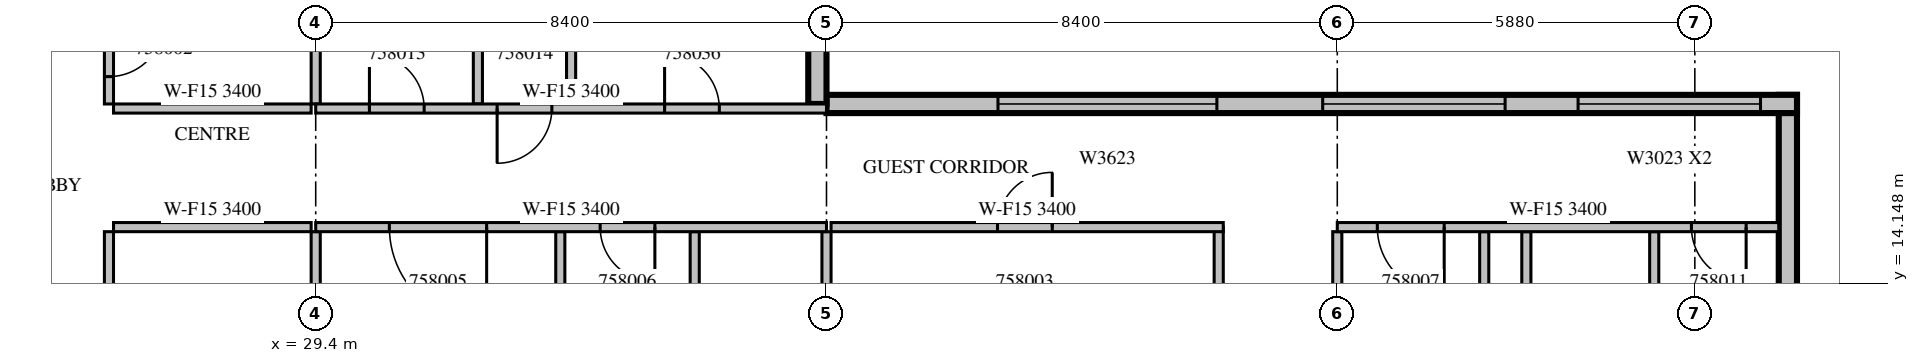
"""IFC4 building model, lengths in metres.
Left out: names, types, materials, properties, quantities, classifications, styles, units other than length and angle.
Written with IfcOpenShell. Run it as: python <this file> out.ifc"""

import sys

from ifc_helpers import new_model, si_unit, direction, frame, frame_2d, origin, place, context, subcontext, project, spatial, rectangle, extrude, source, transform, mapped, element, fill, save


model = new_model("IFC4")
c1 = context("Model", 3, precision=1e-05, world=origin(), true_north=direction((0.0, 1.0)))
c2 = subcontext(c1, "Body", "Model", "MODEL_VIEW")
j1 = project(units=[si_unit("LENGTHUNIT", "METRE"), si_unit("PLANEANGLEUNIT", "RADIAN")], contexts=[c1])
p1 = place(None, origin())
s1 = spatial("IfcSite", under=j1, at=p1, CompositionType="ELEMENT")
p2 = place(p1, origin())
s2 = spatial("IfcBuilding", under=s1, at=p2, CompositionType="ELEMENT")
p3 = place(p2, frame((0.0, 0.0, 253.8)))
s3 = spatial("IfcBuildingStorey", under=s2, at=p3, CompositionType="ELEMENT", Elevation=253.8)
m1 = source(origin(), c2, "Body", "SweptSolid", [
    extrude(rectangle(XDim=6.75, YDim=0.3, at=frame_2d((3.375, 0.0))), origin(), (0.0, 0.0, 1.0), 3.4),
])
p4 = place(p3, frame((53.61, 10.5, 0.0), z_axis=(0.0, 0.0, 1.0), x_axis=(0.0, 1.0, 0.0)))
e1 = element("IfcWall", 1, at=p4, inside=s3, PredefinedType="STANDARD", context=c2, shape_type="MappedRepresentation", body=[
    mapped(m1, transform((0.0, 0.0, 0.0), scale=1.0)),
])
m2 = source(origin(), c2, "Body", "SweptSolid", [
    extrude(rectangle(XDim=1.8, YDim=2.3, at=frame_2d((0.9, 1.15))), frame((0.0, 0.16, 0.0), z_axis=(0.0, -1.0, 0.0), x_axis=(1.0, 0.0, 0.0)), (0.0, 0.0, 1.0), 0.32),
])
p5 = place(p4, frame((0.787, 0.0, 0.6)))
e2 = element("IfcOpeningElement", 2, at=p5, cuts=e1, PredefinedType="OPENING", context=c2, shape_type="MappedRepresentation", body=[
    mapped(m2, transform((0.0, 0.0, 0.0), scale=1.0)),
])
m3 = source(origin(), c2, "Body", "SweptSolid", [
    extrude(rectangle(XDim=15.96, YDim=0.3, at=frame_2d((7.98, 0.0))), origin(), (0.0, 0.0, 1.0), 3.4),
])
p6 = place(p3, frame((53.76, 17.1, 0.0), z_axis=(0.0, 0.0, 1.0), x_axis=(-1.0, 0.0, 0.0)))
e3 = element("IfcWall", 3, at=p6, inside=s3, PredefinedType="STANDARD", context=c2, shape_type="MappedRepresentation", body=[
    mapped(m3, transform((0.0, 0.0, 0.0), scale=1.0)),
])
m4 = source(origin(), c2, "Body", "SweptSolid", [
    extrude(rectangle(XDim=3.0, YDim=2.3, at=frame_2d((1.5, 1.15))), frame((0.0, 0.16, 0.0), z_axis=(0.0, -1.0, 0.0), x_axis=(1.0, 0.0, 0.0)), (0.0, 0.0, 1.0), 0.32),
])
p7 = place(p6, frame((0.6, 0.0, 0.6)))
e4 = element("IfcOpeningElement", 4, at=p7, cuts=e3, PredefinedType="OPENING", context=c2, shape_type="MappedRepresentation", body=[
    mapped(m4, transform((0.0, 0.0, 0.0), scale=1.0)),
])
p8 = place(p6, frame((4.8, 0.0, 0.6)))
e5 = element("IfcOpeningElement", 5, at=p8, cuts=e3, PredefinedType="OPENING", context=c2, shape_type="MappedRepresentation", body=[
    mapped(m4, transform((0.0, 0.0, 0.0), scale=1.0)),
])
m5 = source(origin(), c2, "Body", "SweptSolid", [
    extrude(rectangle(XDim=3.6, YDim=2.3, at=frame_2d((1.8, 1.15))), frame((0.0, 0.16, 0.0), z_axis=(0.0, -1.0, 0.0), x_axis=(1.0, 0.0, 0.0)), (0.0, 0.0, 1.0), 0.32),
])
p9 = place(p6, frame((9.54, 0.0, 0.6)))
e6 = element("IfcOpeningElement", 6, at=p9, cuts=e3, PredefinedType="OPENING", context=c2, shape_type="MappedRepresentation", body=[
    mapped(m5, transform((0.0, 0.0, 0.0), scale=1.0)),
])
m6 = source(origin(), c2, "Body", "SweptSolid", [
    extrude(rectangle(XDim=3.1, YDim=0.3, at=frame_2d((1.55, 0.0))), origin(), (0.0, 0.0, 1.0), 3.4),
])
p10 = place(p3, frame((37.65, 17.1, 0.0), z_axis=(0.0, 0.0, 1.0), x_axis=(0.0, 1.0, 0.0)))
e7 = element("IfcWall", 7, at=p10, inside=s3, PredefinedType="STANDARD", context=c2, shape_type="MappedRepresentation", body=[
    mapped(m6, transform((0.0, 0.0, 0.0), scale=1.0)),
])
p11 = place(p10, frame((1.125, 0.0, 0.6)))
e8 = element("IfcOpeningElement", 8, at=p11, cuts=e7, PredefinedType="OPENING", context=c2, shape_type="MappedRepresentation", body=[
    mapped(m2, transform((0.0, 0.0, 0.0), scale=1.0)),
])
m7 = source(origin(), c2, "Body", "SweptSolid", [
    extrude(rectangle(XDim=4.295, YDim=0.15, at=frame_2d((2.147, 0.0))), origin(), (0.0, 0.0, 1.0), 3.4),
])
p12 = place(p3, frame((26.0, 15.0, 0.0), z_axis=(0.0, 0.0, 1.0), x_axis=(0.0, -1.0, 0.0)))
e9 = element("IfcWall", 9, at=p12, inside=s3, PredefinedType="PARTITIONING", context=c2, shape_type="MappedRepresentation", body=[
    mapped(m7, transform((0.0, 0.0, 0.0), scale=1.0)),
])
m8 = source(origin(), c2, "Body", "SweptSolid", [
    extrude(rectangle(XDim=0.9, YDim=2.1, at=frame_2d((0.45, 1.05))), frame((0.0, 0.085, 0.0), z_axis=(0.0, -1.0, 0.0), x_axis=(1.0, 0.0, 0.0)), (0.0, 0.0, 1.0), 0.17),
])
p13 = place(p12, frame((1.113, 0.0, 0.0)))
e10 = element("IfcOpeningElement", 10, at=p13, cuts=e9, PredefinedType="OPENING", context=c2, shape_type="MappedRepresentation", body=[
    mapped(m8, transform((0.0, 0.0, 0.0), scale=1.0)),
])
m9 = source(origin(), c2, "Body", "SweptSolid", [
    extrude(rectangle(XDim=3.6, YDim=0.15, at=frame_2d((1.8, 0.0))), origin(), (0.0, 0.0, 1.0), 3.4),
])
p14 = place(p3, frame((26.0, 20.7, 0.0), z_axis=(0.0, 0.0, 1.0), x_axis=(0.0, -1.0, 0.0)))
e11 = element("IfcWall", 11, at=p14, inside=s3, PredefinedType="PARTITIONING", context=c2, shape_type="MappedRepresentation", body=[
    mapped(m9, transform((0.0, 0.0, 0.0), scale=1.0)),
])
p15 = place(p14, frame((2.25, 0.0, 0.0)))
e12 = element("IfcOpeningElement", 12, at=p15, cuts=e11, PredefinedType="OPENING", context=c2, shape_type="MappedRepresentation", body=[
    mapped(m8, transform((0.0, 0.0, 0.0), scale=1.0)),
])
m10 = source(origin(), c2, "Body", "SweptSolid", [
    extrude(rectangle(XDim=3.25, YDim=0.15, at=frame_2d((1.625, 0.0))), origin(), (0.0, 0.0, 1.0), 3.4),
])
for number, where, z_axis, x_axis in (
    (13, (29.325, 15.075, 0.0), (0.0, 0.0, 1.0), (-1.0, 0.0, 0.0)),
    (14, (26.075, 17.025, 0.0), (0.0, 0.0, 1.0), (1.0, 0.0, 0.0)),
):
    element("IfcWall", number, at=place(p3, frame(where, z_axis=z_axis, x_axis=x_axis)), inside=s3, PredefinedType="PARTITIONING", context=c2, shape_type="MappedRepresentation", body=[
        mapped(m10, transform((0.0, 0.0, 0.0), scale=1.0)),
    ])
m11 = source(origin(), c2, "Body", "SweptSolid", [
    extrude(rectangle(XDim=4.101, YDim=0.15, at=frame_2d((2.05, 0.0))), origin(), (0.0, 0.0, 1.0), 3.4),
])
p16 = place(p3, frame((29.4, 10.899, 0.0), z_axis=(0.0, 0.0, 1.0), x_axis=(0.0, 1.0, 0.0)))
e15 = element("IfcWall", 15, at=p16, inside=s3, PredefinedType="PARTITIONING", context=c2, shape_type="MappedRepresentation", body=[
    mapped(m11, transform((0.0, 0.0, 0.0), scale=1.0)),
])
m12 = source(origin(), c2, "Body", "SweptSolid", [
    extrude(rectangle(XDim=3.101, YDim=0.15, at=frame_2d((1.55, 0.0))), origin(), (0.0, 0.0, 1.0), 3.4),
])
p17 = place(p3, frame((29.4, 17.1, 0.0), z_axis=(0.0, 0.0, 1.0), x_axis=(0.0, 1.0, 0.0)))
e16 = element("IfcWall", 16, at=p17, inside=s3, PredefinedType="PARTITIONING", context=c2, shape_type="MappedRepresentation", body=[
    mapped(m12, transform((0.0, 0.0, 0.0), scale=1.0)),
])
m13 = source(origin(), c2, "Body", "SweptSolid", [
    extrude(rectangle(XDim=3.175, YDim=0.15, at=frame_2d((1.587, 0.0))), origin(), (0.0, 0.0, 1.0), 3.4),
])
p18 = place(p3, frame((44.25, 11.9, 0.0), z_axis=(0.0, 0.0, 1.0), x_axis=(0.0, 1.0, 0.0)))
e17 = element("IfcWall", 17, at=p18, inside=s3, PredefinedType="PARTITIONING", context=c2, shape_type="MappedRepresentation", body=[
    mapped(m13, transform((0.0, 0.0, 0.0), scale=1.0)),
])
m14 = source(origin(), c2, "Body", "SweptSolid", [
    extrude(rectangle(XDim=6.45, YDim=0.15, at=frame_2d((3.225, 0.0))), origin(), (0.0, 0.0, 1.0), 3.4),
])
p19 = place(p3, frame((44.325, 15.075, 0.0), z_axis=(0.0, 0.0, 1.0), x_axis=(-1.0, 0.0, 0.0)))
e18 = element("IfcWall", 18, at=p19, inside=s3, PredefinedType="PARTITIONING", context=c2, shape_type="MappedRepresentation", body=[
    mapped(m14, transform((0.0, 0.0, 0.0), scale=1.0)),
])
p20 = place(p19, frame((2.812, 0.0, 0.0)))
e19 = element("IfcOpeningElement", 19, at=p20, cuts=e18, PredefinedType="OPENING", context=c2, shape_type="MappedRepresentation", body=[
    mapped(m8, transform((0.0, 0.0, 0.0), scale=1.0)),
])
p21 = place(p3, frame((33.422, 10.705, 0.0), z_axis=(0.0, 0.0, 1.0), x_axis=(0.0, 1.0, 0.0)))
e20 = element("IfcWall", 20, at=p21, inside=s3, PredefinedType="PARTITIONING", context=c2, shape_type="MappedRepresentation", body=[
    mapped(m7, transform((0.0, 0.0, 0.0), scale=1.0)),
])
p22 = place(p3, frame((35.633, 10.705, 0.0), z_axis=(0.0, 0.0, 1.0), x_axis=(0.0, 1.0, 0.0)))
e21 = element("IfcWall", 21, at=p22, inside=s3, PredefinedType="PARTITIONING", context=c2, shape_type="MappedRepresentation", body=[
    mapped(m7, transform((0.0, 0.0, 0.0), scale=1.0)),
])
p23 = place(p22, frame((1.698, 0.0, 0.0)))
e22 = element("IfcOpeningElement", 22, at=p23, cuts=e21, PredefinedType="OPENING", context=c2, shape_type="MappedRepresentation", body=[
    mapped(m8, transform((0.0, 0.0, 0.0), scale=1.0)),
])
p24 = place(p3, frame((37.8, 10.899, 0.0), z_axis=(0.0, 0.0, 1.0), x_axis=(0.0, 1.0, 0.0)))
e23 = element("IfcWall", 23, at=p24, inside=s3, PredefinedType="PARTITIONING", context=c2, shape_type="MappedRepresentation", body=[
    mapped(m11, transform((0.0, 0.0, 0.0), scale=1.0)),
])
m15 = source(origin(), c2, "Body", "SweptSolid", [
    extrude(rectangle(XDim=3.95, YDim=0.15, at=frame_2d((1.975, 0.0))), origin(), (0.0, 0.0, 1.0), 3.4),
])
for number, where, z_axis, x_axis in (
    (24, (48.617, 11.05, 0.0), (0.0, 0.0, 1.0), (0.0, 1.0, 0.0)),
    (25, (49.309, 11.05, 0.0), (0.0, 0.0, 1.0), (0.0, 1.0, 0.0)),
    (26, (51.412, 11.05, 0.0), (0.0, 0.0, 1.0), (0.0, 1.0, 0.0)),
    (27, (46.2, 11.05, 0.0), (0.0, 0.0, 1.0), (0.0, 1.0, 0.0)),
):
    element("IfcWall", number, at=place(p3, frame(where, z_axis=z_axis, x_axis=x_axis)), inside=s3, PredefinedType="PARTITIONING", context=c2, shape_type="MappedRepresentation", body=[
        mapped(m15, transform((0.0, 0.0, 0.0), scale=1.0)),
    ])
for number, where, z_axis, x_axis in (
    (28, (32.067, 20.7, 0.0), (0.0, 0.0, 1.0), (0.0, -1.0, 0.0)),
    (29, (33.6, 17.1, 0.0), (0.0, 0.0, 1.0), (0.0, 1.0, 0.0)),
):
    element("IfcWall", number, at=place(p3, frame(where, z_axis=z_axis, x_axis=x_axis)), inside=s3, PredefinedType="PARTITIONING", context=c2, shape_type="MappedRepresentation", body=[
        mapped(m9, transform((0.0, 0.0, 0.0), scale=1.0)),
    ])
m16 = source(origin(), c2, "Body", "SweptSolid", [
    extrude(rectangle(XDim=8.4, YDim=0.15, at=frame_2d((4.2, 0.0))), origin(), (0.0, 0.0, 1.0), 3.4),
])
p25 = place(p3, frame((37.8, 15.075, 0.0), z_axis=(0.0, 0.0, 1.0), x_axis=(-1.0, 0.0, 0.0)))
e30 = element("IfcWall", 30, at=p25, inside=s3, PredefinedType="PARTITIONING", context=c2, shape_type="MappedRepresentation", body=[
    mapped(m16, transform((0.0, 0.0, 0.0), scale=1.0)),
])
m17 = source(origin(), c2, "Body", "SweptSolid", [
    extrude(rectangle(XDim=1.6, YDim=2.1, at=frame_2d((0.8, 1.05))), frame((0.0, 0.085, 0.0), z_axis=(0.0, -1.0, 0.0), x_axis=(1.0, 0.0, 0.0)), (0.0, 0.0, 1.0), 0.17),
])
p26 = place(p25, frame((5.589, 0.0, 0.0)))
e31 = element("IfcOpeningElement", 31, at=p26, cuts=e30, PredefinedType="OPENING", context=c2, shape_type="MappedRepresentation", body=[
    mapped(m17, transform((0.0, 0.0, 0.0), scale=1.0)),
])
p27 = place(p25, frame((2.822, 0.0, 0.0)))
e32 = element("IfcOpeningElement", 32, at=p27, cuts=e30, PredefinedType="OPENING", context=c2, shape_type="MappedRepresentation", body=[
    mapped(m8, transform((0.0, 0.0, 0.0), scale=1.0)),
])
m18 = source(origin(), c2, "Body", "SweptSolid", [
    extrude(rectangle(XDim=7.26, YDim=0.15, at=frame_2d((3.63, 0.0))), origin(), (0.0, 0.0, 1.0), 3.4),
])
p28 = place(p3, frame((53.46, 15.075, 0.0), z_axis=(0.0, 0.0, 1.0), x_axis=(-1.0, 0.0, 0.0)))
e33 = element("IfcWall", 33, at=p28, inside=s3, PredefinedType="PARTITIONING", context=c2, shape_type="MappedRepresentation", body=[
    mapped(m18, transform((0.0, 0.0, 0.0), scale=1.0)),
])
m19 = source(origin(), c2, "Body", "SweptSolid", [
    extrude(rectangle(XDim=1.1, YDim=2.1, at=frame_2d((0.55, 1.05))), frame((0.0, 0.085, 0.0), z_axis=(0.0, -1.0, 0.0), x_axis=(1.0, 0.0, 0.0)), (0.0, 0.0, 1.0), 0.17),
])
p29 = place(p28, frame((5.502, 0.0, 0.0)))
e34 = element("IfcOpeningElement", 34, at=p29, cuts=e33, PredefinedType="OPENING", context=c2, shape_type="MappedRepresentation", body=[
    mapped(m19, transform((0.0, 0.0, 0.0), scale=1.0)),
])
p30 = place(p28, frame((0.536, 0.0, 0.0)))
e35 = element("IfcOpeningElement", 35, at=p30, cuts=e33, PredefinedType="OPENING", context=c2, shape_type="MappedRepresentation", body=[
    mapped(m8, transform((0.0, 0.0, 0.0), scale=1.0)),
])
p31 = place(p3, frame((29.4, 17.025, 0.0), z_axis=(0.0, 0.0, 1.0), x_axis=(1.0, 0.0, 0.0)))
e36 = element("IfcWall", 36, at=p31, inside=s3, PredefinedType="PARTITIONING", context=c2, shape_type="MappedRepresentation", body=[
    mapped(m16, transform((0.0, 0.0, 0.0), scale=1.0)),
])
p32 = place(p31, frame((0.883, 0.0, 0.0)))
e37 = element("IfcOpeningElement", 37, at=p32, cuts=e36, PredefinedType="OPENING", context=c2, shape_type="MappedRepresentation", body=[
    mapped(m8, transform((0.0, 0.0, 0.0), scale=1.0)),
])
p33 = place(p31, frame((2.983, 0.0, 0.0)))
e38 = element("IfcOpeningElement", 38, at=p33, cuts=e36, PredefinedType="OPENING", context=c2, shape_type="MappedRepresentation", body=[
    mapped(m8, transform((0.0, 0.0, 0.0), scale=1.0)),
])
p34 = place(p31, frame((5.737, 0.0, 0.0)))
e39 = element("IfcOpeningElement", 39, at=p34, cuts=e36, PredefinedType="OPENING", context=c2, shape_type="MappedRepresentation", body=[
    mapped(m8, transform((0.0, 0.0, 0.0), scale=1.0)),
])
m20 = source(origin(), c2, "Body", "SweptSolid", [
    extrude(rectangle(XDim=3.0, YDim=2.3, at=frame_2d((1.5, 1.15))), frame((0.0, 0.03, 0.0), z_axis=(0.0, -1.0, 0.0), x_axis=(1.0, 0.0, 0.0)), (0.0, 0.0, 1.0), 0.06),
])
p35 = place(p7, origin())
e40 = element("IfcWindow", 40, at=p35, inside=s3, PartitioningType="SINGLE_PANEL", PredefinedType="WINDOW", context=c2, shape_type="MappedRepresentation", body=[
    mapped(m20, transform((0.0, 0.0, 0.0), scale=1.0)),
])
fill(e4, e40)
p36 = place(p8, origin())
e41 = element("IfcWindow", 41, at=p36, inside=s3, PartitioningType="SINGLE_PANEL", PredefinedType="WINDOW", context=c2, shape_type="MappedRepresentation", body=[
    mapped(m20, transform((0.0, 0.0, 0.0), scale=1.0)),
])
fill(e5, e41)
m21 = source(origin(), c2, "Body", "SweptSolid", [
    extrude(rectangle(XDim=3.6, YDim=2.3, at=frame_2d((1.8, 1.15))), frame((0.0, 0.03, 0.0), z_axis=(0.0, -1.0, 0.0), x_axis=(1.0, 0.0, 0.0)), (0.0, 0.0, 1.0), 0.06),
])
p37 = place(p9, origin())
e42 = element("IfcWindow", 42, at=p37, inside=s3, PartitioningType="SINGLE_PANEL", PredefinedType="WINDOW", context=c2, shape_type="MappedRepresentation", body=[
    mapped(m21, transform((0.0, 0.0, 0.0), scale=1.0)),
])
fill(e6, e42)
m22 = source(origin(), c2, "Body", "SweptSolid", [
    extrude(rectangle(XDim=0.9, YDim=2.1, at=frame_2d((0.45, 1.05))), frame((0.0, 0.025, 0.0), z_axis=(0.0, -1.0, 0.0), x_axis=(1.0, 0.0, 0.0)), (0.0, 0.0, 1.0), 0.05),
])
p38 = place(p15, origin())
e43 = element("IfcDoor", 43, at=p38, inside=s3, OperationType="SINGLE_SWING_LEFT", PredefinedType="DOOR", context=c2, shape_type="MappedRepresentation", body=[
    mapped(m22, transform((0.0, 0.0, 0.0), scale=1.0)),
])
fill(e12, e43)
p39 = place(p20, origin())
e44 = element("IfcDoor", 44, at=p39, inside=s3, OperationType="SINGLE_SWING_RIGHT", PredefinedType="DOOR", context=c2, shape_type="MappedRepresentation", body=[
    mapped(m22, transform((0.0, 0.0, 0.0), scale=1.0)),
])
fill(e19, e44)
m23 = source(origin(), c2, "Body", "SweptSolid", [
    extrude(rectangle(XDim=1.6, YDim=2.1, at=frame_2d((0.8, 1.05))), frame((0.0, 0.025, 0.0), z_axis=(0.0, -1.0, 0.0), x_axis=(1.0, 0.0, 0.0)), (0.0, 0.0, 1.0), 0.05),
])
p40 = place(p26, origin())
e45 = element("IfcDoor", 45, at=p40, inside=s3, OperationType="SINGLE_SWING_LEFT", PredefinedType="DOOR", context=c2, shape_type="MappedRepresentation", body=[
    mapped(m23, transform((0.0, 0.0, 0.0), scale=1.0)),
])
fill(e31, e45)
p41 = place(p27, origin())
e46 = element("IfcDoor", 46, at=p41, inside=s3, OperationType="SINGLE_SWING_LEFT", PredefinedType="DOOR", context=c2, shape_type="MappedRepresentation", body=[
    mapped(m22, transform((0.0, 0.0, 0.0), scale=1.0)),
])
fill(e32, e46)
m24 = source(origin(), c2, "Body", "SweptSolid", [
    extrude(rectangle(XDim=1.1, YDim=2.1, at=frame_2d((0.55, 1.05))), frame((0.0, 0.025, 0.0), z_axis=(0.0, -1.0, 0.0), x_axis=(1.0, 0.0, 0.0)), (0.0, 0.0, 1.0), 0.05),
])
p42 = place(p29, origin())
e47 = element("IfcDoor", 47, at=p42, inside=s3, OperationType="SINGLE_SWING_LEFT", PredefinedType="DOOR", context=c2, shape_type="MappedRepresentation", body=[
    mapped(m24, transform((0.0, 0.0, 0.0), scale=1.0)),
])
fill(e34, e47)
p43 = place(p30, origin())
e48 = element("IfcDoor", 48, at=p43, inside=s3, OperationType="SINGLE_SWING_LEFT", PredefinedType="DOOR", context=c2, shape_type="MappedRepresentation", body=[
    mapped(m22, transform((0.0, 0.0, 0.0), scale=1.0)),
])
fill(e35, e48)
p44 = place(p32, origin())
e49 = element("IfcDoor", 49, at=p44, inside=s3, OperationType="SINGLE_SWING_LEFT", PredefinedType="DOOR", context=c2, shape_type="MappedRepresentation", body=[
    mapped(m22, transform((0.0, 0.0, 0.0), scale=1.0)),
])
fill(e37, e49)
p45 = place(p33, origin())
e50 = element("IfcDoor", 50, at=p45, inside=s3, OperationType="SINGLE_SWING_RIGHT", PredefinedType="DOOR", context=c2, shape_type="MappedRepresentation", body=[
    mapped(m22, transform((0.0, 0.0, 0.0), scale=1.0)),
])
fill(e38, e50)
p46 = place(p34, origin())
e51 = element("IfcDoor", 51, at=p46, inside=s3, OperationType="SINGLE_SWING_LEFT", PredefinedType="DOOR", context=c2, shape_type="MappedRepresentation", body=[
    mapped(m22, transform((0.0, 0.0, 0.0), scale=1.0)),
])
fill(e39, e51)
save(model, sys.argv[1])
